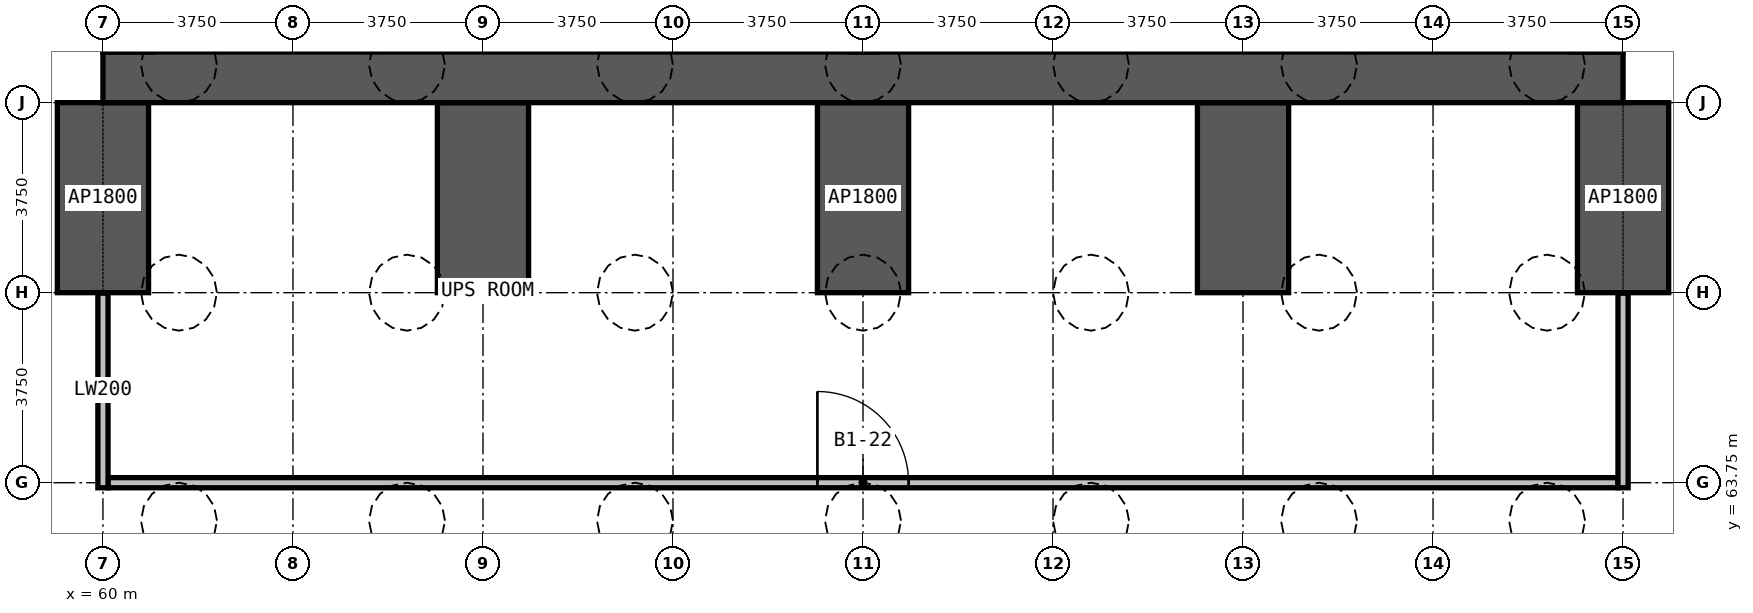
"""IFC4 building model, lengths in metres.
Left out: names, types, materials, properties, quantities, classifications, styles, units other than length and angle.
Written with IfcOpenShell. Run it as: python <this file> out.ifc"""

import sys

from ifc_helpers import new_model, si_unit, direction, frame, frame_2d, origin, place, context, subcontext, project, spatial, rectangle, extrude, element, fill, save


model = new_model("IFC4")
c1 = context("Model", 3, precision=1e-05, world=origin(), true_north=direction((0.0, 1.0)))
c2 = subcontext(c1, "Body", "Model", "MODEL_VIEW")
j1 = project(units=[si_unit("LENGTHUNIT", "METRE"), si_unit("PLANEANGLEUNIT", "RADIAN")], contexts=[c1])
p1 = place(None, origin())
s1 = spatial("IfcSite", under=j1, at=p1, CompositionType="ELEMENT")
p2 = place(p1, origin())
s2 = spatial("IfcBuilding", under=s1, at=p2, CompositionType="ELEMENT")
p3 = place(p2, frame((0.0, 0.0, -6.0)))
s3 = spatial("IfcBuildingStorey", under=s2, at=p3, CompositionType="ELEMENT", Elevation=-6.0)
for number, where, z_axis, x_axis in (
    (1, (60.0, 67.5, 0.0), (0.0, 0.0, 1.0), (0.0, 1.0, 0.0)),
    (2, (67.5, 67.5, 0.0), (0.0, 0.0, 1.0), (0.0, 1.0, 0.0)),
    (3, (75.0, 67.5, 0.0), (0.0, 0.0, 1.0), (0.0, 1.0, 0.0)),
    (4, (82.5, 67.5, 0.0), (0.0, 0.0, 1.0), (0.0, 1.0, 0.0)),
    (5, (90.0, 67.5, 0.0), (0.0, 0.0, 1.0), (0.0, 1.0, 0.0)),
):
    element("IfcWall", number, at=place(p3, frame(where, z_axis=z_axis, x_axis=x_axis)), inside=s3, PredefinedType="SHEAR", context=c2, shape_type="SweptSolid", body=[
        extrude(rectangle(XDim=3.75, YDim=1.8, at=frame_2d((1.875, 0.0))), origin(), (0.0, 0.0, 1.0), 6.0),
    ])
p4 = place(p3, frame((60.0, 71.75, 0.0), z_axis=(0.0, 0.0, 1.0), x_axis=(1.0, 0.0, 0.0)))
e6 = element("IfcWall", 6, at=p4, inside=s3, PredefinedType="SHEAR", context=c2, shape_type="SweptSolid", body=[
    extrude(rectangle(XDim=30.0, YDim=1.0, at=frame_2d((15.0, 0.0))), origin(), (0.0, 0.0, 1.0), 6.0),
])
p5 = place(p3, frame((60.1, 63.75, 0.0), z_axis=(0.0, 0.0, 1.0), x_axis=(1.0, 0.0, 0.0)))
e7 = element("IfcWall", 7, at=p5, inside=s3, PredefinedType="PARTITIONING", context=c2, shape_type="SweptSolid", body=[
    extrude(rectangle(XDim=29.8, YDim=0.2, at=frame_2d((14.9, 0.0))), origin(), (0.0, 0.0, 1.0), 5.65),
])
p6 = place(p5, frame((14.0, 0.0, 0.0)))
e8 = element("IfcOpeningElement", 8, at=p6, cuts=e7, PredefinedType="OPENING", context=c2, shape_type="SweptSolid", body=[
    extrude(rectangle(XDim=1.8, YDim=2.4, at=frame_2d((0.9, 1.2))), frame((0.0, 0.11, 0.0), z_axis=(0.0, -1.0, 0.0), x_axis=(1.0, 0.0, 0.0)), (0.0, 0.0, 1.0), 0.22),
])
for number, where, z_axis, x_axis in (
    (9, (60.0, 63.65, 0.0), (0.0, 0.0, 1.0), (0.0, 1.0, 0.0)),
    (10, (90.0, 63.65, 0.0), (0.0, 0.0, 1.0), (0.0, 1.0, 0.0)),
):
    element("IfcWall", number, at=place(p3, frame(where, z_axis=z_axis, x_axis=x_axis)), inside=s3, PredefinedType="PARTITIONING", context=c2, shape_type="SweptSolid", body=[
        extrude(rectangle(XDim=3.84, YDim=0.2, at=frame_2d((1.92, 0.0))), origin(), (0.0, 0.0, 1.0), 5.65),
    ])
p7 = place(p6, origin())
e11 = element("IfcDoor", 11, at=p7, inside=s3, OperationType="DOUBLE_DOOR_SINGLE_SWING", PredefinedType="DOOR", context=c2, shape_type="SweptSolid", body=[
    extrude(rectangle(XDim=1.8, YDim=2.4, at=frame_2d((0.9, 1.2))), frame((0.0, 0.025, 0.0), z_axis=(0.0, -1.0, 0.0), x_axis=(1.0, 0.0, 0.0)), (0.0, 0.0, 1.0), 0.05),
])
fill(e8, e11)
save(model, sys.argv[1])
